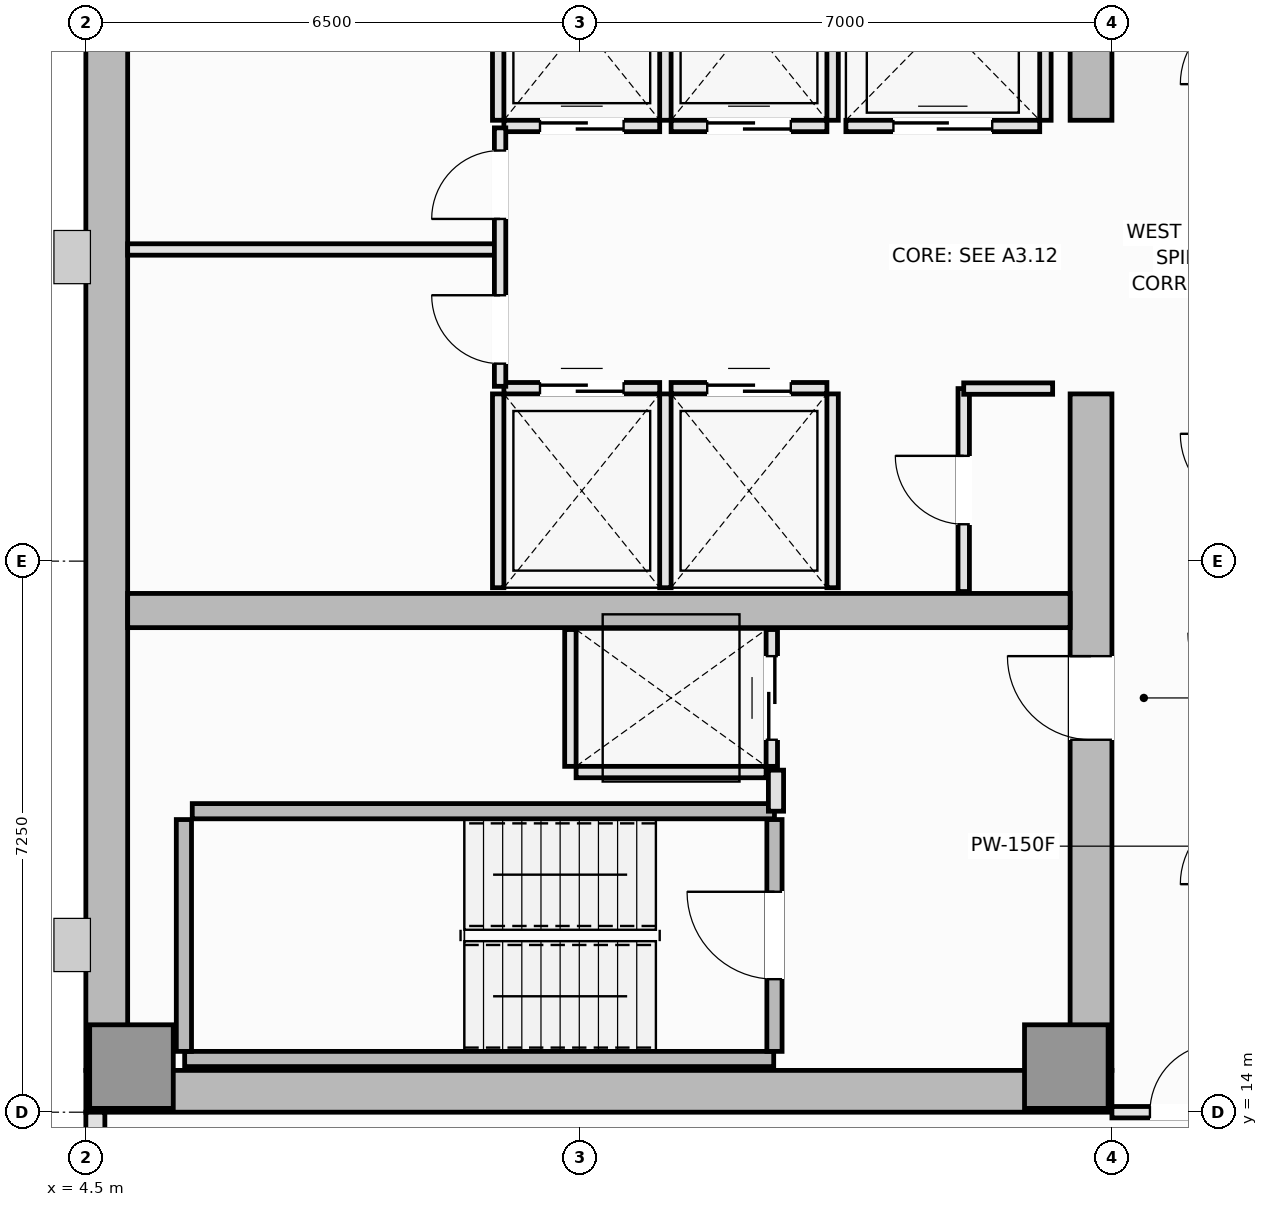
"""IFC4 building model, lengths in metres.
Left out: names, types, materials, properties, quantities, classifications, styles, units other than length and angle.
Written with IfcOpenShell. Run it as: python <this file> out.ifc"""

import sys

from ifc_helpers import new_model, si_unit, direction, frame, frame_2d, origin, origin_2d, place, context, subcontext, project, spatial, rectangle, extrude, element, fill, save


model = new_model("IFC4")
c1 = context("Model", 3, precision=1e-05, world=origin(), true_north=direction((0.0, 1.0)))
c2 = subcontext(c1, "Body", "Model", "MODEL_VIEW")
j1 = project(units=[si_unit("LENGTHUNIT", "METRE"), si_unit("PLANEANGLEUNIT", "RADIAN")], contexts=[c1])
p1 = place(None, origin())
s1 = spatial("IfcSite", under=j1, at=p1, CompositionType="ELEMENT")
p2 = place(p1, origin())
s2 = spatial("IfcBuilding", under=s1, at=p2, CompositionType="ELEMENT")
p3 = place(p2, frame((0.0, 0.0, 212.9)))
s3 = spatial("IfcBuildingStorey", under=s2, at=p3, CompositionType="ELEMENT", Elevation=212.9)
p4 = place(p3, frame((4.5, 14.275, 0.0), z_axis=(0.0, 0.0, 1.0), x_axis=(1.0, 0.0, 0.0)))
e1 = element("IfcWall", 1, at=p4, inside=s3, PredefinedType="SHEAR", context=c2, shape_type="SweptSolid", body=[
    extrude(rectangle(XDim=13.5, YDim=0.55, at=frame_2d((6.75, 0.0))), origin(), (0.0, 0.0, 1.0), 3.55),
])
p5 = place(p3, frame((4.775, 14.55, 0.0), z_axis=(0.0, 0.0, 1.0), x_axis=(0.0, 1.0, 0.0)))
e2 = element("IfcWall", 2, at=p5, inside=s3, PredefinedType="SHEAR", context=c2, shape_type="SweptSolid", body=[
    extrude(rectangle(XDim=21.4, YDim=0.55, at=frame_2d((10.7, 0.0))), origin(), (0.0, 0.0, 1.0), 3.55),
])
p6 = place(p3, frame((17.725, 14.55, 0.0), z_axis=(0.0, 0.0, 1.0), x_axis=(0.0, 1.0, 0.0)))
e3 = element("IfcWall", 3, at=p6, inside=s3, PredefinedType="SHEAR", context=c2, shape_type="SweptSolid", body=[
    extrude(rectangle(XDim=8.9, YDim=0.55, at=frame_2d((4.45, 0.0))), origin(), (0.0, 0.0, 1.0), 3.55),
])
p7 = place(p6, frame((4.35, 0.0, 0.0)))
e4 = element("IfcOpeningElement", 4, at=p7, cuts=e3, PredefinedType="OPENING", context=c2, shape_type="SweptSolid", body=[
    extrude(rectangle(XDim=1.1, YDim=2.15, at=frame_2d((0.55, 1.075))), frame((0.0, 0.285, 0.0), z_axis=(0.0, -1.0, 0.0), x_axis=(1.0, 0.0, 0.0)), (0.0, 0.0, 1.0), 0.57),
])
p8 = place(p3, frame((17.725, 27.05, 0.0), z_axis=(0.0, 0.0, 1.0), x_axis=(0.0, 1.0, 0.0)))
e5 = element("IfcWall", 5, at=p8, inside=s3, PredefinedType="SHEAR", context=c2, shape_type="SweptSolid", body=[
    extrude(rectangle(XDim=8.9, YDim=0.55, at=frame_2d((4.45, 0.0))), origin(), (0.0, 0.0, 1.0), 3.55),
])
p9 = place(p8, frame((3.45, 0.0, 0.0)))
e6 = element("IfcOpeningElement", 6, at=p9, cuts=e5, PredefinedType="OPENING", context=c2, shape_type="SweptSolid", body=[
    extrude(rectangle(XDim=1.1, YDim=2.15, at=frame_2d((0.55, 1.075))), frame((0.0, 0.285, 0.0), z_axis=(0.0, -1.0, 0.0), x_axis=(1.0, 0.0, 0.0)), (0.0, 0.0, 1.0), 0.57),
])
p10 = place(p3, frame((5.05, 20.6, 0.0), z_axis=(0.0, 0.0, 1.0), x_axis=(1.0, 0.0, 0.0)))
e7 = element("IfcWall", 7, at=p10, inside=s3, PredefinedType="SHEAR", context=c2, shape_type="SweptSolid", body=[
    extrude(rectangle(XDim=12.4, YDim=0.45, at=frame_2d((6.2, 0.0))), origin(), (0.0, 0.0, 1.0), 3.55),
])
for number, where, z_axis, x_axis in (
    (8, (5.1, 14.6, 0.0), (0.0, 0.0, 1.0), (1.0, 0.0, 0.0)),
    (9, (17.4, 14.6, 0.0), (0.0, 0.0, 1.0), (1.0, 0.0, 0.0)),
):
    element("IfcColumn", number, at=place(p3, frame(where, z_axis=z_axis, x_axis=x_axis)), inside=s3, PredefinedType="PILASTER", context=c2, shape_type="SweptSolid", body=[
        extrude(rectangle(XDim=1.1, YDim=1.1, at=origin_2d()), origin(), (0.0, 0.0, 1.0), 3.55),
    ])
p11 = place(p3, frame((4.625, 14.0, 0.0), z_axis=(0.0, 0.0, 1.0), x_axis=(0.0, -1.0, 0.0)))
e10 = element("IfcWall", 10, at=p11, inside=s3, PredefinedType="SOLIDWALL", context=c2, shape_type="SweptSolid", body=[
    extrude(rectangle(XDim=4.0, YDim=0.25, at=frame_2d((2.0, 0.0))), origin(), (0.0, 0.0, 1.0), 3.37),
])
p12 = place(p11, frame((0.9, 0.0, 0.9)))
e11 = element("IfcOpeningElement", 11, at=p12, cuts=e10, PredefinedType="OPENING", context=c2, shape_type="SweptSolid", body=[
    extrude(rectangle(XDim=2.2, YDim=1.8, at=frame_2d((1.1, 0.9))), frame((0.0, 0.135, 0.0), z_axis=(0.0, -1.0, 0.0), x_axis=(1.0, 0.0, 0.0)), (0.0, 0.0, 1.0), 0.27),
])
p13 = place(p3, frame((5.8, 14.7, 0.0), z_axis=(0.0, 0.0, 1.0), x_axis=(1.0, 0.0, 0.0)))
e12 = element("IfcWall", 12, at=p13, inside=s3, PredefinedType="SOLIDWALL", context=c2, shape_type="SweptSolid", body=[
    extrude(rectangle(XDim=7.75, YDim=0.2, at=frame_2d((3.875, 0.0))), origin(), (0.0, 0.0, 1.0), 3.55),
])
p14 = place(p3, frame((5.79, 14.8, 0.0), z_axis=(0.0, 0.0, 1.0), x_axis=(0.0, 1.0, 0.0)))
e13 = element("IfcWall", 13, at=p14, inside=s3, PredefinedType="SOLIDWALL", context=c2, shape_type="SweptSolid", body=[
    extrude(rectangle(XDim=3.05, YDim=0.2, at=frame_2d((1.525, 0.0))), origin(), (0.0, 0.0, 1.0), 3.55),
])
p15 = place(p3, frame((5.9, 17.96, 0.0), z_axis=(0.0, 0.0, 1.0), x_axis=(1.0, 0.0, 0.0)))
e14 = element("IfcWall", 14, at=p15, inside=s3, PredefinedType="SOLIDWALL", context=c2, shape_type="SweptSolid", body=[
    extrude(rectangle(XDim=7.66, YDim=0.2, at=frame_2d((3.83, 0.0))), origin(), (0.0, 0.0, 1.0), 3.55),
])
p16 = place(p3, frame((13.56, 14.8, 0.0), z_axis=(0.0, 0.0, 1.0), x_axis=(0.0, 1.0, 0.0)))
e15 = element("IfcWall", 15, at=p16, inside=s3, PredefinedType="SOLIDWALL", context=c2, shape_type="SweptSolid", body=[
    extrude(rectangle(XDim=3.05, YDim=0.2, at=frame_2d((1.525, 0.0))), origin(), (0.0, 0.0, 1.0), 3.55),
])
p17 = place(p16, frame((0.95, 0.0, 0.0)))
e16 = element("IfcOpeningElement", 16, at=p17, cuts=e15, PredefinedType="OPENING", context=c2, shape_type="SweptSolid", body=[
    extrude(rectangle(XDim=1.15, YDim=2.15, at=frame_2d((0.575, 1.075))), frame((0.0, 0.11, 0.0), z_axis=(0.0, -1.0, 0.0), x_axis=(1.0, 0.0, 0.0)), (0.0, 0.0, 1.0), 0.22),
])
p18 = place(p3, frame((10.0, 23.525, 0.0), z_axis=(0.0, 0.0, 1.0), x_axis=(1.0, 0.0, 0.0)))
e17 = element("IfcWall", 17, at=p18, inside=s3, PredefinedType="PARTITIONING", context=c2, shape_type="SweptSolid", body=[
    extrude(rectangle(XDim=2.05, YDim=0.15, at=frame_2d((1.025, 0.0))), origin(), (0.0, 0.0, 1.0), 3.37),
])
p19 = place(p18, frame((0.475, 0.0, 0.0)))
e18 = element("IfcOpeningElement", 18, at=p19, cuts=e17, PredefinedType="OPENING", context=c2, shape_type="SweptSolid", body=[
    extrude(rectangle(XDim=1.1, YDim=2.2, at=frame_2d((0.55, 1.1))), frame((0.0, 0.085, 0.0), z_axis=(0.0, -1.0, 0.0), x_axis=(1.0, 0.0, 0.0)), (0.0, 0.0, 1.0), 0.17),
])
for number, where, z_axis, x_axis in (
    (19, (9.925, 20.9, 0.0), (0.0, 0.0, 1.0), (0.0, 1.0, 0.0)),
    (20, (12.125, 20.9, 0.0), (0.0, 0.0, 1.0), (0.0, 1.0, 0.0)),
):
    element("IfcWall", number, at=place(p3, frame(where, z_axis=z_axis, x_axis=x_axis)), inside=s3, PredefinedType="PARTITIONING", context=c2, shape_type="SweptSolid", body=[
        extrude(rectangle(XDim=2.55, YDim=0.15, at=frame_2d((1.275, 0.0))), origin(), (0.0, 0.0, 1.0), 3.37),
    ])
p20 = place(p3, frame((12.2, 23.525, 0.0), z_axis=(0.0, 0.0, 1.0), x_axis=(1.0, 0.0, 0.0)))
e21 = element("IfcWall", 21, at=p20, inside=s3, PredefinedType="PARTITIONING", context=c2, shape_type="SweptSolid", body=[
    extrude(rectangle(XDim=2.05, YDim=0.15, at=frame_2d((1.025, 0.0))), origin(), (0.0, 0.0, 1.0), 3.37),
])
p21 = place(p20, frame((0.475, 0.0, 0.0)))
e22 = element("IfcOpeningElement", 22, at=p21, cuts=e21, PredefinedType="OPENING", context=c2, shape_type="SweptSolid", body=[
    extrude(rectangle(XDim=1.1, YDim=2.2, at=frame_2d((0.55, 1.1))), frame((0.0, 0.085, 0.0), z_axis=(0.0, -1.0, 0.0), x_axis=(1.0, 0.0, 0.0)), (0.0, 0.0, 1.0), 0.17),
])
p22 = place(p3, frame((14.325, 20.9, 0.0), z_axis=(0.0, 0.0, 1.0), x_axis=(0.0, 1.0, 0.0)))
e23 = element("IfcWall", 23, at=p22, inside=s3, PredefinedType="PARTITIONING", context=c2, shape_type="SweptSolid", body=[
    extrude(rectangle(XDim=2.55, YDim=0.15, at=frame_2d((1.275, 0.0))), origin(), (0.0, 0.0, 1.0), 3.37),
])
p23 = place(p3, frame((10.0, 26.975, 0.0), z_axis=(0.0, 0.0, 1.0), x_axis=(1.0, 0.0, 0.0)))
e24 = element("IfcWall", 24, at=p23, inside=s3, PredefinedType="PARTITIONING", context=c2, shape_type="SweptSolid", body=[
    extrude(rectangle(XDim=2.05, YDim=0.15, at=frame_2d((1.025, 0.0))), origin(), (0.0, 0.0, 1.0), 3.37),
])
p24 = place(p23, frame((0.475, 0.0, 0.0)))
e25 = element("IfcOpeningElement", 25, at=p24, cuts=e24, PredefinedType="OPENING", context=c2, shape_type="SweptSolid", body=[
    extrude(rectangle(XDim=1.1, YDim=2.2, at=frame_2d((0.55, 1.1))), frame((0.0, 0.085, 0.0), z_axis=(0.0, -1.0, 0.0), x_axis=(1.0, 0.0, 0.0)), (0.0, 0.0, 1.0), 0.17),
])
for number, where, z_axis, x_axis in (
    (26, (9.925, 27.05, 0.0), (0.0, 0.0, 1.0), (0.0, 1.0, 0.0)),
    (27, (12.125, 27.05, 0.0), (0.0, 0.0, 1.0), (0.0, 1.0, 0.0)),
):
    element("IfcWall", number, at=place(p3, frame(where, z_axis=z_axis, x_axis=x_axis)), inside=s3, PredefinedType="PARTITIONING", context=c2, shape_type="SweptSolid", body=[
        extrude(rectangle(XDim=2.55, YDim=0.15, at=frame_2d((1.275, 0.0))), origin(), (0.0, 0.0, 1.0), 3.37),
    ])
p25 = place(p3, frame((12.2, 26.975, 0.0), z_axis=(0.0, 0.0, 1.0), x_axis=(1.0, 0.0, 0.0)))
e28 = element("IfcWall", 28, at=p25, inside=s3, PredefinedType="PARTITIONING", context=c2, shape_type="SweptSolid", body=[
    extrude(rectangle(XDim=2.05, YDim=0.15, at=frame_2d((1.025, 0.0))), origin(), (0.0, 0.0, 1.0), 3.37),
])
p26 = place(p25, frame((0.475, 0.0, 0.0)))
e29 = element("IfcOpeningElement", 29, at=p26, cuts=e28, PredefinedType="OPENING", context=c2, shape_type="SweptSolid", body=[
    extrude(rectangle(XDim=1.1, YDim=2.2, at=frame_2d((0.55, 1.1))), frame((0.0, 0.085, 0.0), z_axis=(0.0, -1.0, 0.0), x_axis=(1.0, 0.0, 0.0)), (0.0, 0.0, 1.0), 0.17),
])
p27 = place(p3, frame((14.325, 27.05, 0.0), z_axis=(0.0, 0.0, 1.0), x_axis=(0.0, 1.0, 0.0)))
e30 = element("IfcWall", 30, at=p27, inside=s3, PredefinedType="PARTITIONING", context=c2, shape_type="SweptSolid", body=[
    extrude(rectangle(XDim=2.55, YDim=0.15, at=frame_2d((1.275, 0.0))), origin(), (0.0, 0.0, 1.0), 3.37),
])
p28 = place(p3, frame((14.5, 26.975, 0.0), z_axis=(0.0, 0.0, 1.0), x_axis=(1.0, 0.0, 0.0)))
e31 = element("IfcWall", 31, at=p28, inside=s3, PredefinedType="PARTITIONING", context=c2, shape_type="SweptSolid", body=[
    extrude(rectangle(XDim=2.55, YDim=0.15, at=frame_2d((1.275, 0.0))), origin(), (0.0, 0.0, 1.0), 3.37),
])
p29 = place(p28, frame((0.625, 0.0, 0.0)))
e32 = element("IfcOpeningElement", 32, at=p29, cuts=e31, PredefinedType="OPENING", context=c2, shape_type="SweptSolid", body=[
    extrude(rectangle(XDim=1.3, YDim=2.2, at=frame_2d((0.65, 1.1))), frame((0.0, 0.085, 0.0), z_axis=(0.0, -1.0, 0.0), x_axis=(1.0, 0.0, 0.0)), (0.0, 0.0, 1.0), 0.17),
])
p30 = place(p3, frame((17.125, 27.05, 0.0), z_axis=(0.0, 0.0, 1.0), x_axis=(0.0, 1.0, 0.0)))
e33 = element("IfcWall", 33, at=p30, inside=s3, PredefinedType="PARTITIONING", context=c2, shape_type="SweptSolid", body=[
    extrude(rectangle(XDim=2.6, YDim=0.15, at=frame_2d((1.3, 0.0))), origin(), (0.0, 0.0, 1.0), 3.37),
])
p31 = place(p3, frame((10.95, 18.475, 0.0), z_axis=(0.0, 0.0, 1.0), x_axis=(1.0, 0.0, 0.0)))
e34 = element("IfcWall", 34, at=p31, inside=s3, PredefinedType="PARTITIONING", context=c2, shape_type="SweptSolid", body=[
    extrude(rectangle(XDim=2.5, YDim=0.15, at=frame_2d((1.25, 0.0))), origin(), (0.0, 0.0, 1.0), 3.37),
])
p32 = place(p3, frame((10.875, 18.55, 0.0), z_axis=(0.0, 0.0, 1.0), x_axis=(0.0, 1.0, 0.0)))
e35 = element("IfcWall", 35, at=p32, inside=s3, PredefinedType="PARTITIONING", context=c2, shape_type="SweptSolid", body=[
    extrude(rectangle(XDim=1.8, YDim=0.15, at=frame_2d((0.9, 0.0))), origin(), (0.0, 0.0, 1.0), 3.37),
])
p33 = place(p3, frame((13.525, 18.55, 0.0), z_axis=(0.0, 0.0, 1.0), x_axis=(0.0, 1.0, 0.0)))
e36 = element("IfcWall", 36, at=p33, inside=s3, PredefinedType="PARTITIONING", context=c2, shape_type="SweptSolid", body=[
    extrude(rectangle(XDim=1.8, YDim=0.15, at=frame_2d((0.9, 0.0))), origin(), (0.0, 0.0, 1.0), 3.37),
])
p34 = place(p33, frame((0.35, 0.0, 0.0)))
e37 = element("IfcOpeningElement", 37, at=p34, cuts=e36, PredefinedType="OPENING", context=c2, shape_type="SweptSolid", body=[
    extrude(rectangle(XDim=1.1, YDim=2.2, at=frame_2d((0.55, 1.1))), frame((0.0, 0.085, 0.0), z_axis=(0.0, -1.0, 0.0), x_axis=(1.0, 0.0, 0.0)), (0.0, 0.0, 1.0), 0.17),
])
p35 = place(p3, frame((13.58, 17.96, 0.0), z_axis=(0.0, 0.0, 1.0), x_axis=(0.0, 1.0, 0.0)))
e38 = element("IfcWall", 38, at=p35, inside=s3, PredefinedType="PARTITIONING", context=c2, shape_type="SweptSolid", body=[
    extrude(rectangle(XDim=0.54, YDim=0.2, at=frame_2d((0.27, 0.0))), origin(), (0.0, 0.0, 1.0), 3.37),
])
p36 = place(p3, frame((5.05, 25.35, 0.0), z_axis=(0.0, 0.0, 1.0), x_axis=(1.0, 0.0, 0.0)))
e39 = element("IfcWall", 39, at=p36, inside=s3, PredefinedType="PARTITIONING", context=c2, shape_type="SweptSolid", body=[
    extrude(rectangle(XDim=4.9, YDim=0.15, at=frame_2d((2.45, 0.0))), origin(), (0.0, 0.0, 1.0), 3.37),
])
p37 = place(p3, frame((9.95, 23.55, 0.0), z_axis=(0.0, 0.0, 1.0), x_axis=(0.0, 1.0, 0.0)))
e40 = element("IfcWall", 40, at=p37, inside=s3, PredefinedType="PARTITIONING", context=c2, shape_type="SweptSolid", body=[
    extrude(rectangle(XDim=3.4, YDim=0.15, at=frame_2d((1.7, 0.0))), origin(), (0.0, 0.0, 1.0), 3.37),
])
p38 = place(p37, frame((0.298, 0.0, 0.0)))
e41 = element("IfcOpeningElement", 41, at=p38, cuts=e40, PredefinedType="OPENING", context=c2, shape_type="SweptSolid", body=[
    extrude(rectangle(XDim=0.9, YDim=2.1, at=frame_2d((0.45, 1.05))), frame((0.0, 0.085, 0.0), z_axis=(0.0, -1.0, 0.0), x_axis=(1.0, 0.0, 0.0)), (0.0, 0.0, 1.0), 0.17),
])
p39 = place(p37, frame((2.202, 0.0, 0.0)))
e42 = element("IfcOpeningElement", 42, at=p39, cuts=e40, PredefinedType="OPENING", context=c2, shape_type="SweptSolid", body=[
    extrude(rectangle(XDim=0.9, YDim=2.1, at=frame_2d((0.45, 1.05))), frame((0.0, 0.085, 0.0), z_axis=(0.0, -1.0, 0.0), x_axis=(1.0, 0.0, 0.0)), (0.0, 0.0, 1.0), 0.17),
])
p40 = place(p3, frame((16.05, 20.85, 0.0), z_axis=(0.0, 0.0, 1.0), x_axis=(0.0, 1.0, 0.0)))
e43 = element("IfcWall", 43, at=p40, inside=s3, PredefinedType="PARTITIONING", context=c2, shape_type="SweptSolid", body=[
    extrude(rectangle(XDim=2.67, YDim=0.15, at=frame_2d((1.335, 0.0))), origin(), (0.0, 0.0, 1.0), 3.37),
])
p41 = place(p40, frame((0.885, 0.0, 0.0)))
e44 = element("IfcOpeningElement", 44, at=p41, cuts=e43, PredefinedType="OPENING", context=c2, shape_type="SweptSolid", body=[
    extrude(rectangle(XDim=0.9, YDim=2.1, at=frame_2d((0.45, 1.05))), frame((0.0, 0.085, 0.0), z_axis=(0.0, -1.0, 0.0), x_axis=(1.0, 0.0, 0.0)), (0.0, 0.0, 1.0), 0.17),
])
p42 = place(p3, frame((16.05, 23.52, 0.0), z_axis=(0.0, 0.0, 1.0), x_axis=(1.0, 0.0, 0.0)))
e45 = element("IfcWall", 45, at=p42, inside=s3, PredefinedType="PARTITIONING", context=c2, shape_type="SweptSolid", body=[
    extrude(rectangle(XDim=1.17, YDim=0.15, at=frame_2d((0.585, 0.0))), origin(), (0.0, 0.0, 1.0), 3.37),
])
p43 = place(p3, frame((18.0, 14.0, 0.0), z_axis=(0.0, 0.0, 1.0), x_axis=(1.0, 0.0, 0.0)))
e46 = element("IfcWall", 46, at=p43, inside=s3, PredefinedType="PARTITIONING", context=c2, shape_type="SweptSolid", body=[
    extrude(rectangle(XDim=1.9, YDim=0.15, at=frame_2d((0.95, 0.0))), origin(), (0.0, 0.0, 1.0), 3.37),
])
p44 = place(p43, frame((0.5, 0.0, 0.0)))
e47 = element("IfcOpeningElement", 47, at=p44, cuts=e46, PredefinedType="OPENING", context=c2, shape_type="SweptSolid", body=[
    extrude(rectangle(XDim=0.9, YDim=2.1, at=frame_2d((0.45, 1.05))), frame((0.0, 0.085, 0.0), z_axis=(0.0, -1.0, 0.0), x_axis=(1.0, 0.0, 0.0)), (0.0, 0.0, 1.0), 0.17),
])
p45 = place(p17, origin())
e48 = element("IfcDoor", 48, at=p45, inside=s3, OperationType="SINGLE_SWING_RIGHT", PredefinedType="DOOR", context=c2, shape_type="SweptSolid", body=[
    extrude(rectangle(XDim=1.15, YDim=2.15, at=frame_2d((0.575, 1.075))), frame((0.0, 0.025, 0.0), z_axis=(0.0, -1.0, 0.0), x_axis=(1.0, 0.0, 0.0)), (0.0, 0.0, 1.0), 0.05),
])
fill(e16, e48)
p46 = place(p19, origin())
e49 = element("IfcDoor", 49, at=p46, inside=s3, OperationType="DOUBLE_DOOR_SLIDING", PredefinedType="DOOR", context=c2, shape_type="SweptSolid", body=[
    extrude(rectangle(XDim=1.1, YDim=2.2, at=frame_2d((0.55, 1.1))), frame((0.0, 0.025, 0.0), z_axis=(0.0, -1.0, 0.0), x_axis=(1.0, 0.0, 0.0)), (0.0, 0.0, 1.0), 0.05),
])
fill(e18, e49)
p47 = place(p21, origin())
e50 = element("IfcDoor", 50, at=p47, inside=s3, OperationType="DOUBLE_DOOR_SLIDING", PredefinedType="DOOR", context=c2, shape_type="SweptSolid", body=[
    extrude(rectangle(XDim=1.1, YDim=2.2, at=frame_2d((0.55, 1.1))), frame((0.0, 0.025, 0.0), z_axis=(0.0, -1.0, 0.0), x_axis=(1.0, 0.0, 0.0)), (0.0, 0.0, 1.0), 0.05),
])
fill(e22, e50)
p48 = place(p24, origin())
e51 = element("IfcDoor", 51, at=p48, inside=s3, OperationType="DOUBLE_DOOR_SLIDING", PredefinedType="DOOR", context=c2, shape_type="SweptSolid", body=[
    extrude(rectangle(XDim=1.1, YDim=2.2, at=frame_2d((0.55, 1.1))), frame((0.0, 0.025, 0.0), z_axis=(0.0, -1.0, 0.0), x_axis=(1.0, 0.0, 0.0)), (0.0, 0.0, 1.0), 0.05),
])
fill(e25, e51)
p49 = place(p26, origin())
e52 = element("IfcDoor", 52, at=p49, inside=s3, OperationType="DOUBLE_DOOR_SLIDING", PredefinedType="DOOR", context=c2, shape_type="SweptSolid", body=[
    extrude(rectangle(XDim=1.1, YDim=2.2, at=frame_2d((0.55, 1.1))), frame((0.0, 0.025, 0.0), z_axis=(0.0, -1.0, 0.0), x_axis=(1.0, 0.0, 0.0)), (0.0, 0.0, 1.0), 0.05),
])
fill(e29, e52)
p50 = place(p29, origin())
e53 = element("IfcDoor", 53, at=p50, inside=s3, OperationType="DOUBLE_DOOR_SLIDING", PredefinedType="DOOR", context=c2, shape_type="SweptSolid", body=[
    extrude(rectangle(XDim=1.3, YDim=2.2, at=frame_2d((0.65, 1.1))), frame((0.0, 0.025, 0.0), z_axis=(0.0, -1.0, 0.0), x_axis=(1.0, 0.0, 0.0)), (0.0, 0.0, 1.0), 0.05),
])
fill(e32, e53)
p51 = place(p34, origin())
e54 = element("IfcDoor", 54, at=p51, inside=s3, OperationType="DOUBLE_DOOR_SLIDING", PredefinedType="DOOR", context=c2, shape_type="SweptSolid", body=[
    extrude(rectangle(XDim=1.1, YDim=2.2, at=frame_2d((0.55, 1.1))), frame((0.0, 0.025, 0.0), z_axis=(0.0, -1.0, 0.0), x_axis=(1.0, 0.0, 0.0)), (0.0, 0.0, 1.0), 0.05),
])
fill(e37, e54)
p52 = place(p7, origin())
e55 = element("IfcDoor", 55, at=p52, inside=s3, OperationType="SINGLE_SWING_RIGHT", PredefinedType="DOOR", context=c2, shape_type="SweptSolid", body=[
    extrude(rectangle(XDim=1.1, YDim=2.15, at=frame_2d((0.55, 1.075))), frame((0.0, 0.025, 0.0), z_axis=(0.0, -1.0, 0.0), x_axis=(1.0, 0.0, 0.0)), (0.0, 0.0, 1.0), 0.05),
])
fill(e4, e55)
p53 = place(p38, origin())
e56 = element("IfcDoor", 56, at=p53, inside=s3, OperationType="SINGLE_SWING_RIGHT", PredefinedType="DOOR", context=c2, shape_type="SweptSolid", body=[
    extrude(rectangle(XDim=0.9, YDim=2.1, at=frame_2d((0.45, 1.05))), frame((0.0, 0.025, 0.0), z_axis=(0.0, -1.0, 0.0), x_axis=(1.0, 0.0, 0.0)), (0.0, 0.0, 1.0), 0.05),
])
fill(e41, e56)
p54 = place(p39, origin())
e57 = element("IfcDoor", 57, at=p54, inside=s3, OperationType="SINGLE_SWING_LEFT", PredefinedType="DOOR", context=c2, shape_type="SweptSolid", body=[
    extrude(rectangle(XDim=0.9, YDim=2.1, at=frame_2d((0.45, 1.05))), frame((0.0, 0.025, 0.0), z_axis=(0.0, -1.0, 0.0), x_axis=(1.0, 0.0, 0.0)), (0.0, 0.0, 1.0), 0.05),
])
fill(e42, e57)
p55 = place(p41, origin())
e58 = element("IfcDoor", 58, at=p55, inside=s3, OperationType="SINGLE_SWING_RIGHT", PredefinedType="DOOR", context=c2, shape_type="SweptSolid", body=[
    extrude(rectangle(XDim=0.9, YDim=2.1, at=frame_2d((0.45, 1.05))), frame((0.0, 0.025, 0.0), z_axis=(0.0, -1.0, 0.0), x_axis=(1.0, 0.0, 0.0)), (0.0, 0.0, 1.0), 0.05),
])
fill(e44, e58)
p56 = place(p44, origin())
e59 = element("IfcDoor", 59, at=p56, inside=s3, OperationType="SINGLE_SWING_RIGHT", PredefinedType="DOOR", context=c2, shape_type="SweptSolid", body=[
    extrude(rectangle(XDim=0.9, YDim=2.1, at=frame_2d((0.45, 1.05))), frame((0.0, 0.025, 0.0), z_axis=(0.0, -1.0, 0.0), x_axis=(1.0, 0.0, 0.0)), (0.0, 0.0, 1.0), 0.05),
])
fill(e47, e59)
save(model, sys.argv[1])
